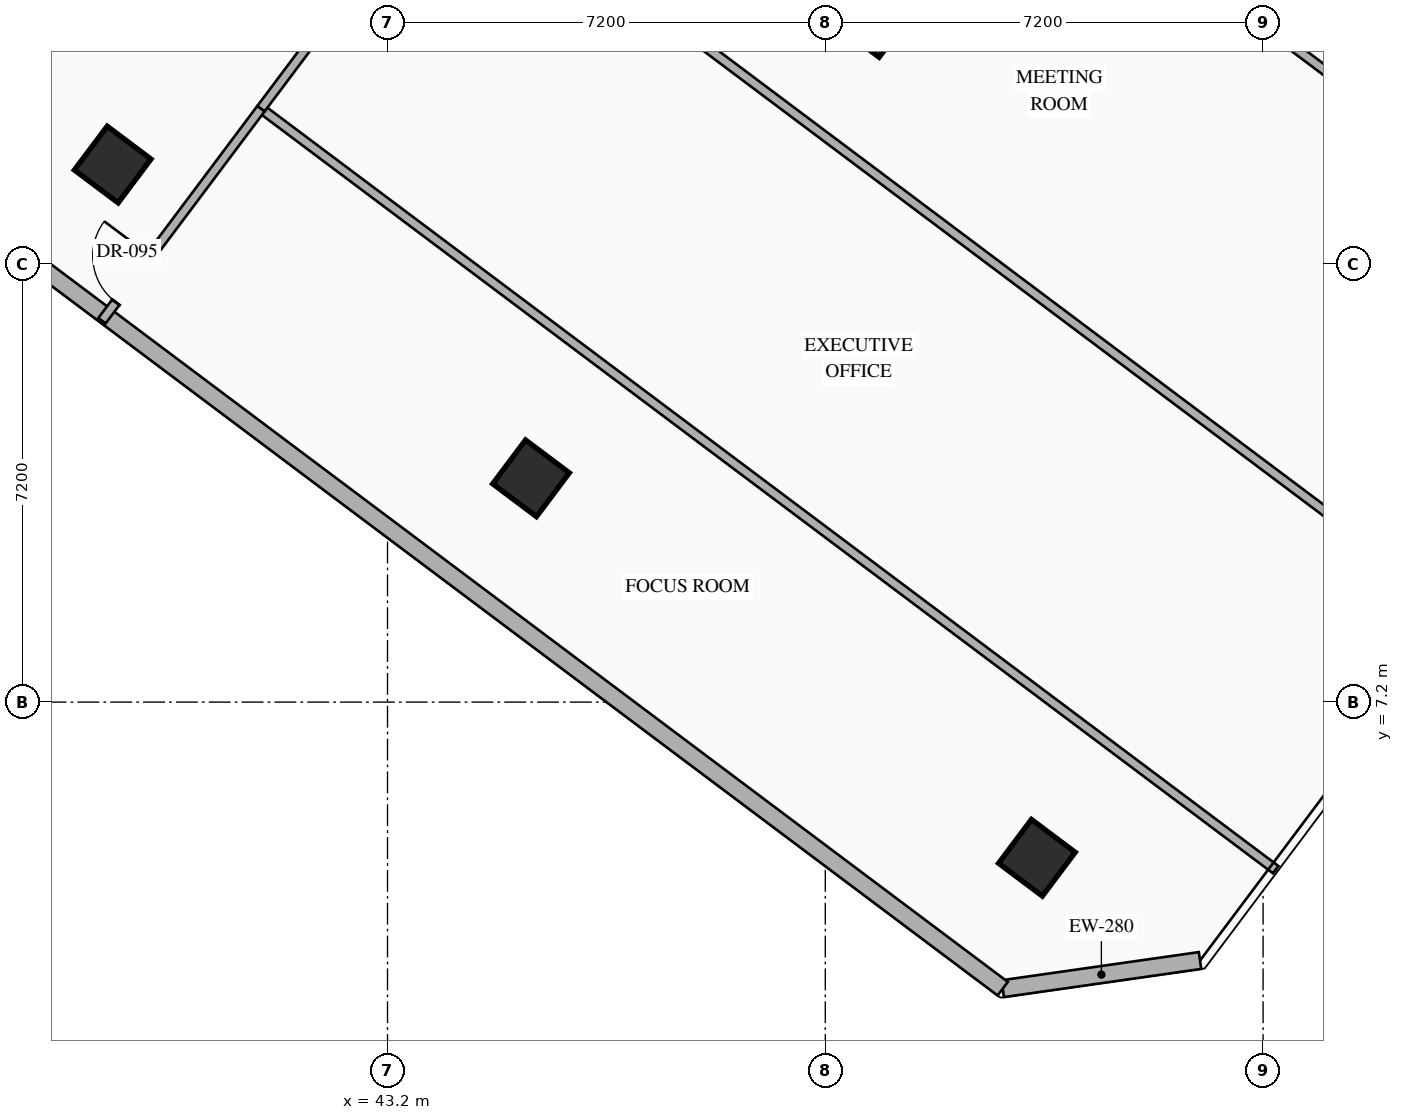
"""IFC4 building model, lengths in metres.
Left out: names, types, materials, properties, quantities, classifications, styles, units other than length and angle.
Written with IfcOpenShell. Run it as: python <this file> out.ifc"""

import sys

from ifc_helpers import new_model, si_unit, direction, frame, frame_2d, origin, origin_2d, place, context, subcontext, project, spatial, rectangle, hollow_rectangle, extrude, element, fill, save


model = new_model("IFC4")
c1 = context("Model", 3, precision=1e-05, world=origin(), true_north=direction((0.0, 1.0)))
c2 = subcontext(c1, "Body", "Model", "MODEL_VIEW")
j1 = project(units=[si_unit("LENGTHUNIT", "METRE"), si_unit("PLANEANGLEUNIT", "RADIAN")], contexts=[c1])
p1 = place(None, origin())
s1 = spatial("IfcSite", under=j1, at=p1, CompositionType="ELEMENT")
p2 = place(p1, origin())
s2 = spatial("IfcBuilding", under=s1, at=p2, CompositionType="ELEMENT")
p3 = place(p2, frame((0.0, 0.0, 112.05)))
s3 = spatial("IfcBuildingStorey", under=s2, at=p3, CompositionType="ELEMENT", Elevation=112.05)
for number, where, z_axis, x_axis in (
    (1, (38.68, 16.04, 0.0), (0.0, 0.0, 1.0), (0.8, -0.6, 0.0)),
    (2, (45.56, 10.88, 0.0), (0.0, 0.0, 1.0), (0.8, -0.6, 0.0)),
):
    element("IfcColumn", number, at=place(p3, frame(where, z_axis=z_axis, x_axis=x_axis)), inside=s3, PredefinedType="COLUMN", context=c2, shape_type="SweptSolid", body=[
        extrude(hollow_rectangle(XDim=0.9, YDim=0.9, WallThickness=0.036, at=origin_2d()), origin(), (0.0, 0.0, 1.0), 3.6),
    ])
p4 = place(p3, frame((51.2, 18.4, 0.0), z_axis=(0.0, 0.0, 1.0), x_axis=(0.799999996291, -0.600000004945, 0.0)))
e3 = element("IfcColumn", 3, at=p4, inside=s3, PredefinedType="COLUMN", context=c2, shape_type="SweptSolid", body=[
    extrude(hollow_rectangle(XDim=0.85, YDim=0.85, WallThickness=0.032, at=origin_2d()), origin(), (0.0, 0.0, 1.0), 3.6),
])
p5 = place(p3, frame((53.88, 4.64, 0.0), z_axis=(0.0, 0.0, 1.0), x_axis=(0.799999996291, -0.600000004945, 0.0)))
e4 = element("IfcColumn", 4, at=p5, inside=s3, PredefinedType="COLUMN", context=c2, shape_type="SweptSolid", body=[
    extrude(hollow_rectangle(XDim=0.9, YDim=0.9, WallThickness=0.036, at=origin_2d()), origin(), (0.0, 0.0, 1.0), 3.6),
])
p6 = place(p3, frame((56.563, 2.95, 0.0), z_axis=(0.0, 0.0, 1.0), x_axis=(-0.989977778067, -0.141223223777, 0.0)))
e5 = element("IfcWall", 5, at=p6, inside=s3, PredefinedType="STANDARD", context=c2, shape_type="SweptSolid", body=[
    extrude(rectangle(XDim=3.278, YDim=0.28, at=frame_2d((1.639, 0.0))), origin(), (0.0, 0.0, 1.0), 3.35),
])
p7 = place(p3, frame((53.318, 2.487, 0.0), z_axis=(0.0, 0.0, 1.0), x_axis=(-0.800004174678, 0.599994433723, 0.0)))
e6 = element("IfcWall", 6, at=p7, inside=s3, PredefinedType="STANDARD", context=c2, shape_type="SweptSolid", body=[
    extrude(rectangle(XDim=35.089, YDim=0.28, at=frame_2d((17.544, 0.0))), origin(), (0.0, 0.0, 1.0), 3.35),
])
p8 = place(p3, frame((41.12, 16.96, 0.0), z_axis=(0.0, 0.0, 1.0), x_axis=(0.800002808908, -0.599996254772, 0.0)))
e7 = element("IfcWall", 7, at=p8, inside=s3, PredefinedType="PARTITIONING", context=c2, shape_type="SweptSolid", body=[
    extrude(rectangle(XDim=20.86, YDim=0.15, at=frame_2d((10.43, 0.0))), origin(), (0.0, 0.0, 1.0), 3.35),
])
p9 = place(p3, frame((38.504, 13.472, 0.0), z_axis=(0.0, 0.0, 1.0), x_axis=(0.600026876565, 0.799979841871, 0.0)))
e8 = element("IfcWall", 8, at=p9, inside=s3, PredefinedType="PARTITIONING", context=c2, shape_type="SweptSolid", body=[
    extrude(rectangle(XDim=4.36, YDim=0.15, at=frame_2d((2.18, 0.0))), origin(), (0.0, 0.0, 1.0), 3.35),
])
p10 = place(p9, frame((0.38, 0.0, 0.0)))
e9 = element("IfcOpeningElement", 9, at=p10, cuts=e8, PredefinedType="OPENING", context=c2, shape_type="SweptSolid", body=[
    extrude(rectangle(XDim=0.95, YDim=2.15, at=frame_2d((0.475, 1.075))), frame((0.0, 0.085, 0.0), z_axis=(0.0, -1.0, 0.0), x_axis=(1.0, 0.0, 0.0)), (0.0, 0.0, 1.0), 0.17),
])
p11 = place(p3, frame((44.24, 21.12, 0.0), z_axis=(0.0, 0.0, 1.0), x_axis=(0.799997191095, -0.600003745189, 0.0)))
e10 = element("IfcWall", 10, at=p11, inside=s3, PredefinedType="PARTITIONING", context=c2, shape_type="SweptSolid", body=[
    extrude(rectangle(XDim=20.86, YDim=0.15, at=frame_2d((10.43, 0.0))), origin(), (0.0, 0.0, 1.0), 2.995),
])
p12 = place(p3, frame((41.12, 16.96, 0.0), z_axis=(0.0, 0.0, 1.0), x_axis=(0.599969951782, 0.800022535282, 0.0)))
e11 = element("IfcWall", 11, at=p12, inside=s3, PredefinedType="PARTITIONING", context=c2, shape_type="SweptSolid", body=[
    extrude(rectangle(XDim=5.2, YDim=0.15, at=frame_2d((2.6, 0.0))), origin(), (0.0, 0.0, 1.0), 3.35),
])
p13 = place(p12, frame((2.125, 0.0, 0.0)))
e12 = element("IfcOpeningElement", 12, at=p13, cuts=e11, PredefinedType="OPENING", context=c2, shape_type="SweptSolid", body=[
    extrude(rectangle(XDim=0.95, YDim=2.15, at=frame_2d((0.475, 1.075))), frame((0.0, 0.085, 0.0), z_axis=(0.0, -1.0, 0.0), x_axis=(1.0, 0.0, 0.0)), (0.0, 0.0, 1.0), 0.17),
])
for number, where, z_axis, x_axis in (
    (13, (47.72, 25.76, 0.0), (0.0, 0.0, 1.0), (0.8, -0.6, 0.0)),
    (14, (50.96, 30.08, 0.0), (0.0, 0.0, 1.0), (0.8, -0.6, 0.0)),
):
    element("IfcWall", number, at=place(p3, frame(where, z_axis=z_axis, x_axis=x_axis)), inside=s3, PredefinedType="PARTITIONING", context=c2, shape_type="SweptSolid", body=[
        extrude(rectangle(XDim=20.86, YDim=0.15, at=frame_2d((10.43, 0.0))), origin(), (0.0, 0.0, 1.0), 3.35),
    ])
p14 = place(p10, origin())
e15 = element("IfcDoor", 15, at=p14, inside=s3, OperationType="SINGLE_SWING_RIGHT", PredefinedType="DOOR", context=c2, shape_type="SweptSolid", body=[
    extrude(rectangle(XDim=0.95, YDim=2.15, at=frame_2d((0.475, 1.075))), frame((0.0, 0.025, 0.0), z_axis=(0.0, -1.0, 0.0), x_axis=(1.0, 0.0, 0.0)), (0.0, 0.0, 1.0), 0.05),
])
fill(e9, e15)
save(model, sys.argv[1])
